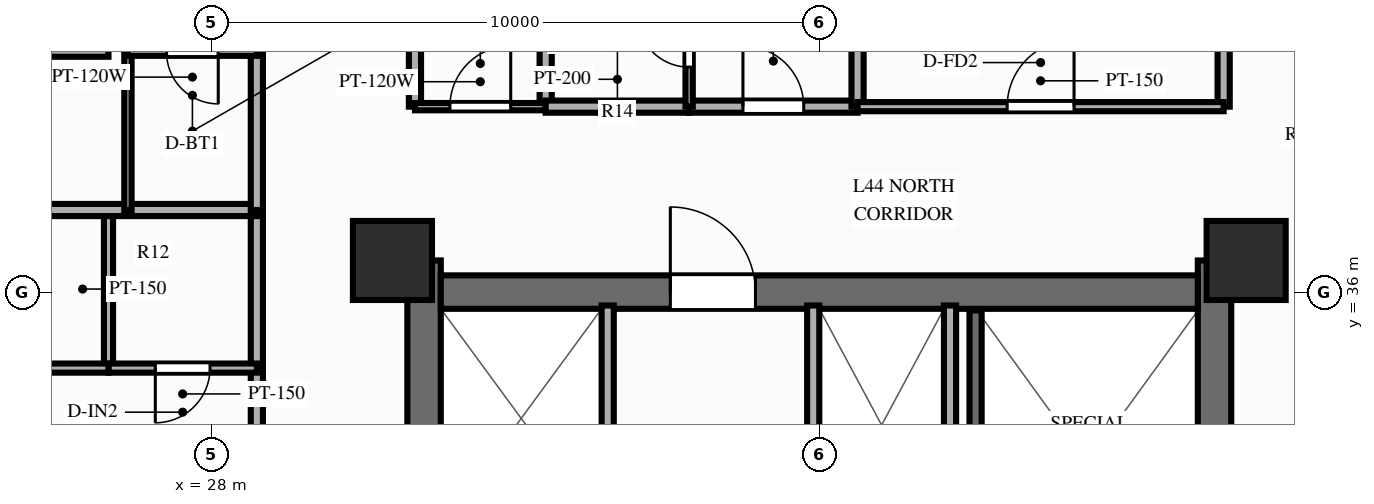
"""IFC4 building model, lengths in metres.
Left out: names, types, materials, properties, quantities, classifications, styles, units other than length and angle.
Written with IfcOpenShell. Run it as: python <this file> out.ifc"""

import sys

from ifc_helpers import new_model, si_unit, direction, frame, frame_2d, origin, origin_2d, place, context, subcontext, project, spatial, rectangle, extrude, source, transform, mapped, element, fill, save


model = new_model("IFC4")
c1 = context("Model", 3, precision=1e-05, world=origin(), true_north=direction((0.0, 1.0)))
c2 = subcontext(c1, "Body", "Model", "MODEL_VIEW")
j1 = project(units=[si_unit("LENGTHUNIT", "METRE"), si_unit("PLANEANGLEUNIT", "RADIAN")], contexts=[c1])
p1 = place(None, origin())
s1 = spatial("IfcSite", under=j1, at=p1, CompositionType="ELEMENT")
p2 = place(p1, origin())
s2 = spatial("IfcBuilding", under=s1, at=p2, CompositionType="ELEMENT")
p3 = place(p2, frame((0.0, 0.0, 138.75)))
s3 = spatial("IfcBuildingStorey", under=s2, at=p3, CompositionType="ELEMENT", Elevation=138.75)
p4 = place(p3, frame((31.5, 17.48, 0.0), z_axis=(0.0, 0.0, 1.0), x_axis=(0.0, 1.0, 0.0)))
e1 = element("IfcWall", 1, at=p4, inside=s3, PredefinedType="SHEAR", context=c2, shape_type="SweptSolid", body=[
    extrude(rectangle(XDim=19.04, YDim=0.55, at=frame_2d((9.52, 0.0))), origin(), (0.0, 0.0, 1.0), 3.0),
])
p5 = place(p4, frame((6.32, 0.0, 0.0)))
e2 = element("IfcOpeningElement", 2, at=p5, cuts=e1, PredefinedType="OPENING", context=c2, shape_type="SweptSolid", body=[
    extrude(rectangle(XDim=1.1, YDim=2.15, at=frame_2d((0.55, 1.075))), frame((0.0, 0.287, 0.0), z_axis=(0.0, -1.0, 0.0), x_axis=(1.0, 0.0, 0.0)), (0.0, 0.0, 1.0), 0.574),
])
p6 = place(p3, frame((44.5, 17.48, 0.0), z_axis=(0.0, 0.0, 1.0), x_axis=(0.0, 1.0, 0.0)))
e3 = element("IfcWall", 3, at=p6, inside=s3, PredefinedType="SHEAR", context=c2, shape_type="SweptSolid", body=[
    extrude(rectangle(XDim=19.04, YDim=0.55, at=frame_2d((9.52, 0.0))), origin(), (0.0, 0.0, 1.0), 3.0),
])
p7 = place(p6, frame((12.67, 0.0, 0.0), z_axis=(0.0, 0.0, 1.0), x_axis=(-1.0, 0.0, 0.0)))
e4 = element("IfcOpeningElement", 4, at=p7, cuts=e3, PredefinedType="OPENING", context=c2, shape_type="SweptSolid", body=[
    extrude(rectangle(XDim=1.1, YDim=2.15, at=frame_2d((0.55, 1.075))), frame((0.0, 0.287, 0.0), z_axis=(0.0, -1.0, 0.0), x_axis=(1.0, 0.0, 0.0)), (0.0, 0.0, 1.0), 0.574),
])
p8 = place(p3, frame((31.775, 36.0, 0.0), z_axis=(0.0, 0.0, 1.0), x_axis=(1.0, 0.0, 0.0)))
e5 = element("IfcWall", 5, at=p8, inside=s3, PredefinedType="SHEAR", context=c2, shape_type="SweptSolid", body=[
    extrude(rectangle(XDim=12.45, YDim=0.55, at=frame_2d((6.225, 0.0))), origin(), (0.0, 0.0, 1.0), 3.0),
])
p9 = place(p8, frame((5.175, 0.0, 0.0), z_axis=(0.0, 0.0, 1.0), x_axis=(-1.0, 0.0, 0.0)))
e6 = element("IfcOpeningElement", 6, at=p9, cuts=e5, PredefinedType="OPENING", context=c2, shape_type="SweptSolid", body=[
    extrude(rectangle(XDim=1.4, YDim=2.15, at=frame_2d((0.7, 1.075))), frame((0.0, 0.287, 0.0), z_axis=(0.0, -1.0, 0.0), x_axis=(1.0, 0.0, 0.0)), (0.0, 0.0, 1.0), 0.574),
])
m1 = source(origin(), c2, "Body", "SweptSolid", [
    extrude(rectangle(XDim=1.3, YDim=1.3, at=origin_2d()), origin(), (0.0, 0.0, 1.0), 3.0),
])
for number, where, z_axis, x_axis in (
    (7, (30.98, 36.52, 0.0), (0.0, 0.0, 1.0), (1.0, 0.0, 0.0)),
    (8, (45.02, 36.52, 0.0), (0.0, 0.0, 1.0), (1.0, 0.0, 0.0)),
):
    element("IfcColumn", number, at=place(p3, frame(where, z_axis=z_axis, x_axis=x_axis)), inside=s3, PredefinedType="COLUMN", context=c2, shape_type="MappedRepresentation", body=[
        mapped(m1, transform((0.0, 0.0, 0.0), scale=1.0)),
    ])
p10 = place(p3, frame((40.15, 31.8, 0.0), z_axis=(0.0, 0.0, 1.0), x_axis=(0.0, 1.0, 0.0)))
e9 = element("IfcWall", 9, at=p10, inside=s3, PredefinedType="PARTITIONING", context=c2, shape_type="SweptSolid", body=[
    extrude(rectangle(XDim=3.98, YDim=0.2, at=frame_2d((1.99, 0.0))), origin(), (0.0, 0.0, 1.0), 2.79),
])
p11 = place(p3, frame((40.57, 28.65, 0.0), z_axis=(0.0, 0.0, 1.0), x_axis=(0.0, 1.0, 0.0)))
e10 = element("IfcWall", 10, at=p11, inside=s3, PredefinedType="SOLIDWALL", context=c2, shape_type="SweptSolid", body=[
    extrude(rectangle(XDim=7.05, YDim=0.2, at=frame_2d((3.525, 0.0))), origin(), (0.0, 0.0, 1.0), 2.79),
])
p12 = place(p3, frame((34.52, 25.44, 0.0), z_axis=(0.0, 0.0, 1.0), x_axis=(0.0, 1.0, 0.0)))
e11 = element("IfcWall", 11, at=p12, inside=s3, PredefinedType="PARTITIONING", context=c2, shape_type="SweptSolid", body=[
    extrude(rectangle(XDim=10.34, YDim=0.2, at=frame_2d((5.17, 0.0))), origin(), (0.0, 0.0, 1.0), 2.79),
])
p13 = place(p12, frame((2.6, 0.0, 0.0)))
e12 = element("IfcOpeningElement", 12, at=p13, cuts=e11, PredefinedType="OPENING", context=c2, shape_type="SweptSolid", body=[
    extrude(rectangle(XDim=0.9, YDim=2.1, at=frame_2d((0.45, 1.05))), frame((0.0, 0.112, 0.0), z_axis=(0.0, -1.0, 0.0), x_axis=(1.0, 0.0, 0.0)), (0.0, 0.0, 1.0), 0.224),
])
p14 = place(p3, frame((37.9, 25.44, 0.0), z_axis=(0.0, 0.0, 1.0), x_axis=(0.0, 1.0, 0.0)))
e13 = element("IfcWall", 13, at=p14, inside=s3, PredefinedType="PARTITIONING", context=c2, shape_type="SweptSolid", body=[
    extrude(rectangle(XDim=10.34, YDim=0.2, at=frame_2d((5.17, 0.0))), origin(), (0.0, 0.0, 1.0), 2.79),
])
p15 = place(p14, frame((0.32, 0.0, 0.0)))
e14 = element("IfcOpeningElement", 14, at=p15, cuts=e13, PredefinedType="OPENING", context=c2, shape_type="SweptSolid", body=[
    extrude(rectangle(XDim=1.0, YDim=2.15, at=frame_2d((0.5, 1.075))), frame((0.0, 0.112, 0.0), z_axis=(0.0, -1.0, 0.0), x_axis=(1.0, 0.0, 0.0)), (0.0, 0.0, 1.0), 0.224),
])
p16 = place(p14, frame((1.71, 0.0, 0.0)))
e15 = element("IfcOpeningElement", 15, at=p16, cuts=e13, PredefinedType="OPENING", context=c2, shape_type="SweptSolid", body=[
    extrude(rectangle(XDim=1.0, YDim=2.15, at=frame_2d((0.5, 1.075))), frame((0.0, 0.112, 0.0), z_axis=(0.0, -1.0, 0.0), x_axis=(1.0, 0.0, 0.0)), (0.0, 0.0, 1.0), 0.224),
])
p17 = place(p14, frame((3.51, 0.0, 0.0)))
e16 = element("IfcOpeningElement", 16, at=p17, cuts=e13, PredefinedType="OPENING", context=c2, shape_type="SweptSolid", body=[
    extrude(rectangle(XDim=1.0, YDim=2.15, at=frame_2d((0.5, 1.075))), frame((0.0, 0.112, 0.0), z_axis=(0.0, -1.0, 0.0), x_axis=(1.0, 0.0, 0.0)), (0.0, 0.0, 1.0), 0.224),
])
p18 = place(p14, frame((5.01, 0.0, 0.0)))
e17 = element("IfcOpeningElement", 17, at=p18, cuts=e13, PredefinedType="OPENING", context=c2, shape_type="SweptSolid", body=[
    extrude(rectangle(XDim=1.0, YDim=2.15, at=frame_2d((0.5, 1.075))), frame((0.0, 0.112, 0.0), z_axis=(0.0, -1.0, 0.0), x_axis=(1.0, 0.0, 0.0)), (0.0, 0.0, 1.0), 0.224),
])
for number, where, z_axis, x_axis in (
    (18, (31.35, 39.05, 0.0), (0.0, 0.0, 1.0), (0.0, 1.0, 0.0)),
    (19, (44.65, 39.05, 0.0), (0.0, 0.0, 1.0), (0.0, 1.0, 0.0)),
):
    element("IfcWall", number, at=place(p3, frame(where, z_axis=z_axis, x_axis=x_axis)), inside=s3, PredefinedType="PARTITIONING", context=c2, shape_type="SweptSolid", body=[
        extrude(rectangle(XDim=11.8, YDim=0.2, at=frame_2d((5.9, 0.0))), origin(), (0.0, 0.0, 1.0), 2.34),
    ])
p19 = place(p3, frame((33.5, 39.05, 0.0), z_axis=(0.0, 0.0, 1.0), x_axis=(0.0, 1.0, 0.0)))
e20 = element("IfcWall", 20, at=p19, inside=s3, PredefinedType="PARTITIONING", context=c2, shape_type="SweptSolid", body=[
    extrude(rectangle(XDim=11.8, YDim=0.2, at=frame_2d((5.9, 0.0))), origin(), (0.0, 0.0, 1.0), 2.79),
])
p20 = place(p3, frame((31.35, 39.05, 0.0), z_axis=(0.0, 0.0, 1.0), x_axis=(1.0, 0.0, 0.0)))
e21 = element("IfcWall", 21, at=p20, inside=s3, PredefinedType="PARTITIONING", context=c2, shape_type="SweptSolid", body=[
    extrude(rectangle(XDim=2.15, YDim=0.12, at=frame_2d((1.075, 0.0))), origin(), (0.0, 0.0, 1.0), 2.79),
])
p21 = place(p20, frame((0.575, 0.0, 0.0)))
e22 = element("IfcOpeningElement", 22, at=p21, cuts=e21, PredefinedType="OPENING", context=c2, shape_type="SweptSolid", body=[
    extrude(rectangle(XDim=1.0, YDim=2.1, at=frame_2d((0.5, 1.05))), frame((0.0, 0.072, 0.0), z_axis=(0.0, -1.0, 0.0), x_axis=(1.0, 0.0, 0.0)), (0.0, 0.0, 1.0), 0.144),
])
p22 = place(p3, frame((33.5, 39.05, 0.0), z_axis=(0.0, 0.0, 1.0), x_axis=(1.0, 0.0, 0.0)))
e23 = element("IfcWall", 23, at=p22, inside=s3, PredefinedType="PARTITIONING", context=c2, shape_type="SweptSolid", body=[
    extrude(rectangle(XDim=2.359, YDim=0.2, at=frame_2d((1.18, 0.0))), origin(), (0.0, 0.0, 1.0), 2.79),
])
p23 = place(p3, frame((35.859, 39.05, 0.0), z_axis=(0.0, 0.0, 1.0), x_axis=(1.0, 0.0, 0.0)))
e24 = element("IfcWall", 24, at=p23, inside=s3, PredefinedType="PARTITIONING", context=c2, shape_type="SweptSolid", body=[
    extrude(rectangle(XDim=2.77, YDim=0.2, at=frame_2d((1.385, 0.0))), origin(), (0.0, 0.0, 1.0), 2.79),
])
p24 = place(p23, frame((0.885, 0.0, 0.0)))
e25 = element("IfcOpeningElement", 25, at=p24, cuts=e24, PredefinedType="OPENING", context=c2, shape_type="SweptSolid", body=[
    extrude(rectangle(XDim=1.0, YDim=2.15, at=frame_2d((0.5, 1.075))), frame((0.0, 0.112, 0.0), z_axis=(0.0, -1.0, 0.0), x_axis=(1.0, 0.0, 0.0)), (0.0, 0.0, 1.0), 0.224),
])
p25 = place(p3, frame((35.859, 39.05, 0.0), z_axis=(0.0, 0.0, 1.0), x_axis=(0.0, 1.0, 0.0)))
e26 = element("IfcWall", 26, at=p25, inside=s3, PredefinedType="PARTITIONING", context=c2, shape_type="SweptSolid", body=[
    extrude(rectangle(XDim=2.15, YDim=0.12, at=frame_2d((1.075, 0.0))), origin(), (0.0, 0.0, 1.0), 2.79),
])
p26 = place(p25, frame((0.65, 0.0, 0.0)))
e27 = element("IfcOpeningElement", 27, at=p26, cuts=e26, PredefinedType="OPENING", context=c2, shape_type="SweptSolid", body=[
    extrude(rectangle(XDim=0.85, YDim=2.05, at=frame_2d((0.425, 1.025))), frame((0.0, 0.072, 0.0), z_axis=(0.0, -1.0, 0.0), x_axis=(1.0, 0.0, 0.0)), (0.0, 0.0, 1.0), 0.144),
])
p27 = place(p3, frame((38.629, 39.05, 0.0), z_axis=(0.0, 0.0, 1.0), x_axis=(0.0, 1.0, 0.0)))
e28 = element("IfcWall", 28, at=p27, inside=s3, PredefinedType="PARTITIONING", context=c2, shape_type="SweptSolid", body=[
    extrude(rectangle(XDim=11.8, YDim=0.2, at=frame_2d((5.9, 0.0))), origin(), (0.0, 0.0, 1.0), 2.79),
])
p28 = place(p3, frame((38.629, 39.05, 0.0), z_axis=(0.0, 0.0, 1.0), x_axis=(1.0, 0.0, 0.0)))
e29 = element("IfcWall", 29, at=p28, inside=s3, PredefinedType="PARTITIONING", context=c2, shape_type="SweptSolid", body=[
    extrude(rectangle(XDim=6.021, YDim=0.15, at=frame_2d((3.01, 0.0))), origin(), (0.0, 0.0, 1.0), 2.79),
])
p29 = place(p28, frame((2.46, 0.0, 0.0)))
e30 = element("IfcOpeningElement", 30, at=p29, cuts=e29, PredefinedType="OPENING", context=c2, shape_type="SweptSolid", body=[
    extrude(rectangle(XDim=1.1, YDim=2.15, at=frame_2d((0.55, 1.075))), frame((0.0, 0.087, 0.0), z_axis=(0.0, -1.0, 0.0), x_axis=(1.0, 0.0, 0.0)), (0.0, 0.0, 1.0), 0.174),
])
p30 = place(p3, frame((28.75, 30.676, 0.0), z_axis=(0.0, 0.0, 1.0), x_axis=(0.0, 1.0, 0.0)))
e31 = element("IfcWall", 31, at=p30, inside=s3, PredefinedType="PARTITIONING", context=c2, shape_type="SweptSolid", body=[
    extrude(rectangle(XDim=4.074, YDim=0.2, at=frame_2d((2.037, 0.0))), origin(), (0.0, 0.0, 1.0), 2.79),
])
p31 = place(p30, frame((1.537, 0.0, 0.0)))
e32 = element("IfcOpeningElement", 32, at=p31, cuts=e31, PredefinedType="OPENING", context=c2, shape_type="SweptSolid", body=[
    extrude(rectangle(XDim=1.0, YDim=2.15, at=frame_2d((0.5, 1.075))), frame((0.0, 0.112, 0.0), z_axis=(0.0, -1.0, 0.0), x_axis=(1.0, 0.0, 0.0)), (0.0, 0.0, 1.0), 0.224),
])
p32 = place(p3, frame((28.75, 34.75, 0.0), z_axis=(0.0, 0.0, 1.0), x_axis=(0.0, 1.0, 0.0)))
e33 = element("IfcWall", 33, at=p32, inside=s3, PredefinedType="PARTITIONING", context=c2, shape_type="SweptSolid", body=[
    extrude(rectangle(XDim=2.6, YDim=0.2, at=frame_2d((1.3, 0.0))), origin(), (0.0, 0.0, 1.0), 2.79),
])
p33 = place(p3, frame((26.31, 34.75, 0.0), z_axis=(0.0, 0.0, 1.0), x_axis=(0.0, 1.0, 0.0)))
e34 = element("IfcWall", 34, at=p33, inside=s3, PredefinedType="PARTITIONING", context=c2, shape_type="SweptSolid", body=[
    extrude(rectangle(XDim=2.6, YDim=0.15, at=frame_2d((1.3, 0.0))), origin(), (0.0, 0.0, 1.0), 2.79),
])
p34 = place(p3, frame((28.75, 34.75, 0.0), z_axis=(0.0, 0.0, 1.0), x_axis=(-1.0, 0.0, 0.0)))
e35 = element("IfcWall", 35, at=p34, inside=s3, PredefinedType="PARTITIONING", context=c2, shape_type="SweptSolid", body=[
    extrude(rectangle(XDim=2.44, YDim=0.15, at=frame_2d((1.22, 0.0))), origin(), (0.0, 0.0, 1.0), 2.79),
])
p35 = place(p34, frame((0.77, 0.0, 0.0)))
e36 = element("IfcOpeningElement", 36, at=p35, cuts=e35, PredefinedType="OPENING", context=c2, shape_type="SweptSolid", body=[
    extrude(rectangle(XDim=0.9, YDim=2.1, at=frame_2d((0.45, 1.05))), frame((0.0, 0.087, 0.0), z_axis=(0.0, -1.0, 0.0), x_axis=(1.0, 0.0, 0.0)), (0.0, 0.0, 1.0), 0.174),
])
p36 = place(p3, frame((26.31, 34.75, 0.0), z_axis=(0.0, 0.0, 1.0), x_axis=(-1.0, 0.0, 0.0)))
e37 = element("IfcWall", 37, at=p36, inside=s3, PredefinedType="PARTITIONING", context=c2, shape_type="SweptSolid", body=[
    extrude(rectangle(XDim=14.16, YDim=0.15, at=frame_2d((7.08, 0.0))), origin(), (0.0, 0.0, 1.0), 2.79),
])
p37 = place(p36, frame((6.097, 0.0, 0.0)))
e38 = element("IfcOpeningElement", 38, at=p37, cuts=e37, PredefinedType="OPENING", context=c2, shape_type="SweptSolid", body=[
    extrude(rectangle(XDim=0.9, YDim=2.1, at=frame_2d((0.45, 1.05))), frame((0.0, 0.087, 0.0), z_axis=(0.0, -1.0, 0.0), x_axis=(1.0, 0.0, 0.0)), (0.0, 0.0, 1.0), 0.174),
])
p38 = place(p3, frame((28.75, 37.35, 0.0), z_axis=(0.0, 0.0, 1.0), x_axis=(-1.0, 0.0, 0.0)))
e39 = element("IfcWall", 39, at=p38, inside=s3, PredefinedType="PARTITIONING", context=c2, shape_type="SweptSolid", body=[
    extrude(rectangle(XDim=16.6, YDim=0.2, at=frame_2d((8.3, 0.0))), origin(), (0.0, 0.0, 1.0), 2.79),
])
p39 = place(p3, frame((28.75, 37.35, 0.0), z_axis=(0.0, 0.0, 1.0), x_axis=(0.0, 1.0, 0.0)))
e40 = element("IfcWall", 40, at=p39, inside=s3, PredefinedType="PARTITIONING", context=c2, shape_type="SweptSolid", body=[
    extrude(rectangle(XDim=2.595, YDim=0.2, at=frame_2d((1.298, 0.0))), origin(), (0.0, 0.0, 1.0), 2.79),
])
p40 = place(p3, frame((28.75, 39.946, 0.0), z_axis=(0.0, 0.0, 1.0), x_axis=(0.0, 1.0, 0.0)))
e41 = element("IfcWall", 41, at=p40, inside=s3, PredefinedType="PARTITIONING", context=c2, shape_type="SweptSolid", body=[
    extrude(rectangle(XDim=4.074, YDim=0.2, at=frame_2d((2.037, 0.0))), origin(), (0.0, 0.0, 1.0), 2.79),
])
p41 = place(p40, frame((1.537, 0.0, 0.0)))
e42 = element("IfcOpeningElement", 42, at=p41, cuts=e41, PredefinedType="OPENING", context=c2, shape_type="SweptSolid", body=[
    extrude(rectangle(XDim=1.0, YDim=2.15, at=frame_2d((0.5, 1.075))), frame((0.0, 0.112, 0.0), z_axis=(0.0, -1.0, 0.0), x_axis=(1.0, 0.0, 0.0)), (0.0, 0.0, 1.0), 0.224),
])
p42 = place(p3, frame((26.63, 37.35, 0.0), z_axis=(0.0, 0.0, 1.0), x_axis=(0.0, 1.0, 0.0)))
e43 = element("IfcWall", 43, at=p42, inside=s3, PredefinedType="PARTITIONING", context=c2, shape_type="SweptSolid", body=[
    extrude(rectangle(XDim=2.595, YDim=0.12, at=frame_2d((1.298, 0.0))), origin(), (0.0, 0.0, 1.0), 2.79),
])
p43 = place(p3, frame((28.75, 39.946, 0.0), z_axis=(0.0, 0.0, 1.0), x_axis=(-1.0, 0.0, 0.0)))
e44 = element("IfcWall", 44, at=p43, inside=s3, PredefinedType="PARTITIONING", context=c2, shape_type="SweptSolid", body=[
    extrude(rectangle(XDim=2.12, YDim=0.12, at=frame_2d((1.06, 0.0))), origin(), (0.0, 0.0, 1.0), 2.79),
])
p44 = place(p43, frame((0.635, 0.0, 0.0)))
e45 = element("IfcOpeningElement", 45, at=p44, cuts=e44, PredefinedType="OPENING", context=c2, shape_type="SweptSolid", body=[
    extrude(rectangle(XDim=0.85, YDim=2.05, at=frame_2d((0.425, 1.025))), frame((0.0, 0.072, 0.0), z_axis=(0.0, -1.0, 0.0), x_axis=(1.0, 0.0, 0.0)), (0.0, 0.0, 1.0), 0.144),
])
p45 = place(p3, frame((26.31, 39.946, 0.0), z_axis=(0.0, 0.0, 1.0), x_axis=(-1.0, 0.0, 0.0)))
e46 = element("IfcWall", 46, at=p45, inside=s3, PredefinedType="PARTITIONING", context=c2, shape_type="SweptSolid", body=[
    extrude(rectangle(XDim=14.16, YDim=0.15, at=frame_2d((7.08, 0.0))), origin(), (0.0, 0.0, 1.0), 2.79),
])
p46 = place(p45, frame((6.097, 0.0, 0.0)))
e47 = element("IfcOpeningElement", 47, at=p46, cuts=e46, PredefinedType="OPENING", context=c2, shape_type="SweptSolid", body=[
    extrude(rectangle(XDim=0.9, YDim=2.1, at=frame_2d((0.45, 1.05))), frame((0.0, 0.087, 0.0), z_axis=(0.0, -1.0, 0.0), x_axis=(1.0, 0.0, 0.0)), (0.0, 0.0, 1.0), 0.174),
])
m2 = source(origin(), c2, "Body", "SweptSolid", [
    extrude(rectangle(XDim=1.4, YDim=2.15, at=frame_2d((0.7, 1.075))), frame((0.0, 0.025, 0.0), z_axis=(0.0, -1.0, 0.0), x_axis=(1.0, 0.0, 0.0)), (0.0, 0.0, 1.0), 0.05),
])
p47 = place(p9, origin())
e48 = element("IfcDoor", 48, at=p47, inside=s3, OperationType="SINGLE_SWING_RIGHT", PredefinedType="DOOR", context=c2, shape_type="MappedRepresentation", body=[
    mapped(m2, transform((0.0, 0.0, 0.0), scale=1.0)),
])
fill(e6, e48)
m3 = source(origin(), c2, "Body", "SweptSolid", [
    extrude(rectangle(XDim=1.0, YDim=2.1, at=frame_2d((0.5, 1.05))), frame((0.0, 0.025, 0.0), z_axis=(0.0, -1.0, 0.0), x_axis=(1.0, 0.0, 0.0)), (0.0, 0.0, 1.0), 0.05),
])
p48 = place(p21, origin())
e49 = element("IfcDoor", 49, at=p48, inside=s3, OperationType="SINGLE_SWING_RIGHT", PredefinedType="DOOR", context=c2, shape_type="MappedRepresentation", body=[
    mapped(m3, transform((0.0, 0.0, 0.0), scale=1.0)),
])
fill(e22, e49)
m4 = source(origin(), c2, "Body", "SweptSolid", [
    extrude(rectangle(XDim=1.0, YDim=2.15, at=frame_2d((0.5, 1.075))), frame((0.0, 0.025, 0.0), z_axis=(0.0, -1.0, 0.0), x_axis=(1.0, 0.0, 0.0)), (0.0, 0.0, 1.0), 0.05),
])
p49 = place(p24, origin())
e50 = element("IfcDoor", 50, at=p49, inside=s3, OperationType="SINGLE_SWING_LEFT", PredefinedType="DOOR", context=c2, shape_type="MappedRepresentation", body=[
    mapped(m4, transform((0.0, 0.0, 0.0), scale=1.0)),
])
fill(e25, e50)
m5 = source(origin(), c2, "Body", "SweptSolid", [
    extrude(rectangle(XDim=0.85, YDim=2.05, at=frame_2d((0.425, 1.025))), frame((0.0, 0.025, 0.0), z_axis=(0.0, -1.0, 0.0), x_axis=(1.0, 0.0, 0.0)), (0.0, 0.0, 1.0), 0.05),
])
p50 = place(p26, origin())
e51 = element("IfcDoor", 51, at=p50, inside=s3, OperationType="SINGLE_SWING_RIGHT", PredefinedType="DOOR", context=c2, shape_type="MappedRepresentation", body=[
    mapped(m5, transform((0.0, 0.0, 0.0), scale=1.0)),
])
fill(e27, e51)
m6 = source(origin(), c2, "Body", "SweptSolid", [
    extrude(rectangle(XDim=1.1, YDim=2.15, at=frame_2d((0.55, 1.075))), frame((0.0, 0.025, 0.0), z_axis=(0.0, -1.0, 0.0), x_axis=(1.0, 0.0, 0.0)), (0.0, 0.0, 1.0), 0.05),
])
p51 = place(p29, origin())
e52 = element("IfcDoor", 52, at=p51, inside=s3, OperationType="SINGLE_SWING_RIGHT", PredefinedType="DOOR", context=c2, shape_type="MappedRepresentation", body=[
    mapped(m6, transform((0.0, 0.0, 0.0), scale=1.0)),
])
fill(e30, e52)
m7 = source(origin(), c2, "Body", "SweptSolid", [
    extrude(rectangle(XDim=0.9, YDim=2.1, at=frame_2d((0.45, 1.05))), frame((0.0, 0.025, 0.0), z_axis=(0.0, -1.0, 0.0), x_axis=(1.0, 0.0, 0.0)), (0.0, 0.0, 1.0), 0.05),
])
p52 = place(p35, origin())
e53 = element("IfcDoor", 53, at=p52, inside=s3, OperationType="SINGLE_SWING_RIGHT", PredefinedType="DOOR", context=c2, shape_type="MappedRepresentation", body=[
    mapped(m7, transform((0.0, 0.0, 0.0), scale=1.0)),
])
fill(e36, e53)
p53 = place(p44, origin())
e54 = element("IfcDoor", 54, at=p53, inside=s3, OperationType="SINGLE_SWING_LEFT", PredefinedType="DOOR", context=c2, shape_type="MappedRepresentation", body=[
    mapped(m5, transform((0.0, 0.0, 0.0), scale=1.0)),
])
fill(e45, e54)
save(model, sys.argv[1])
